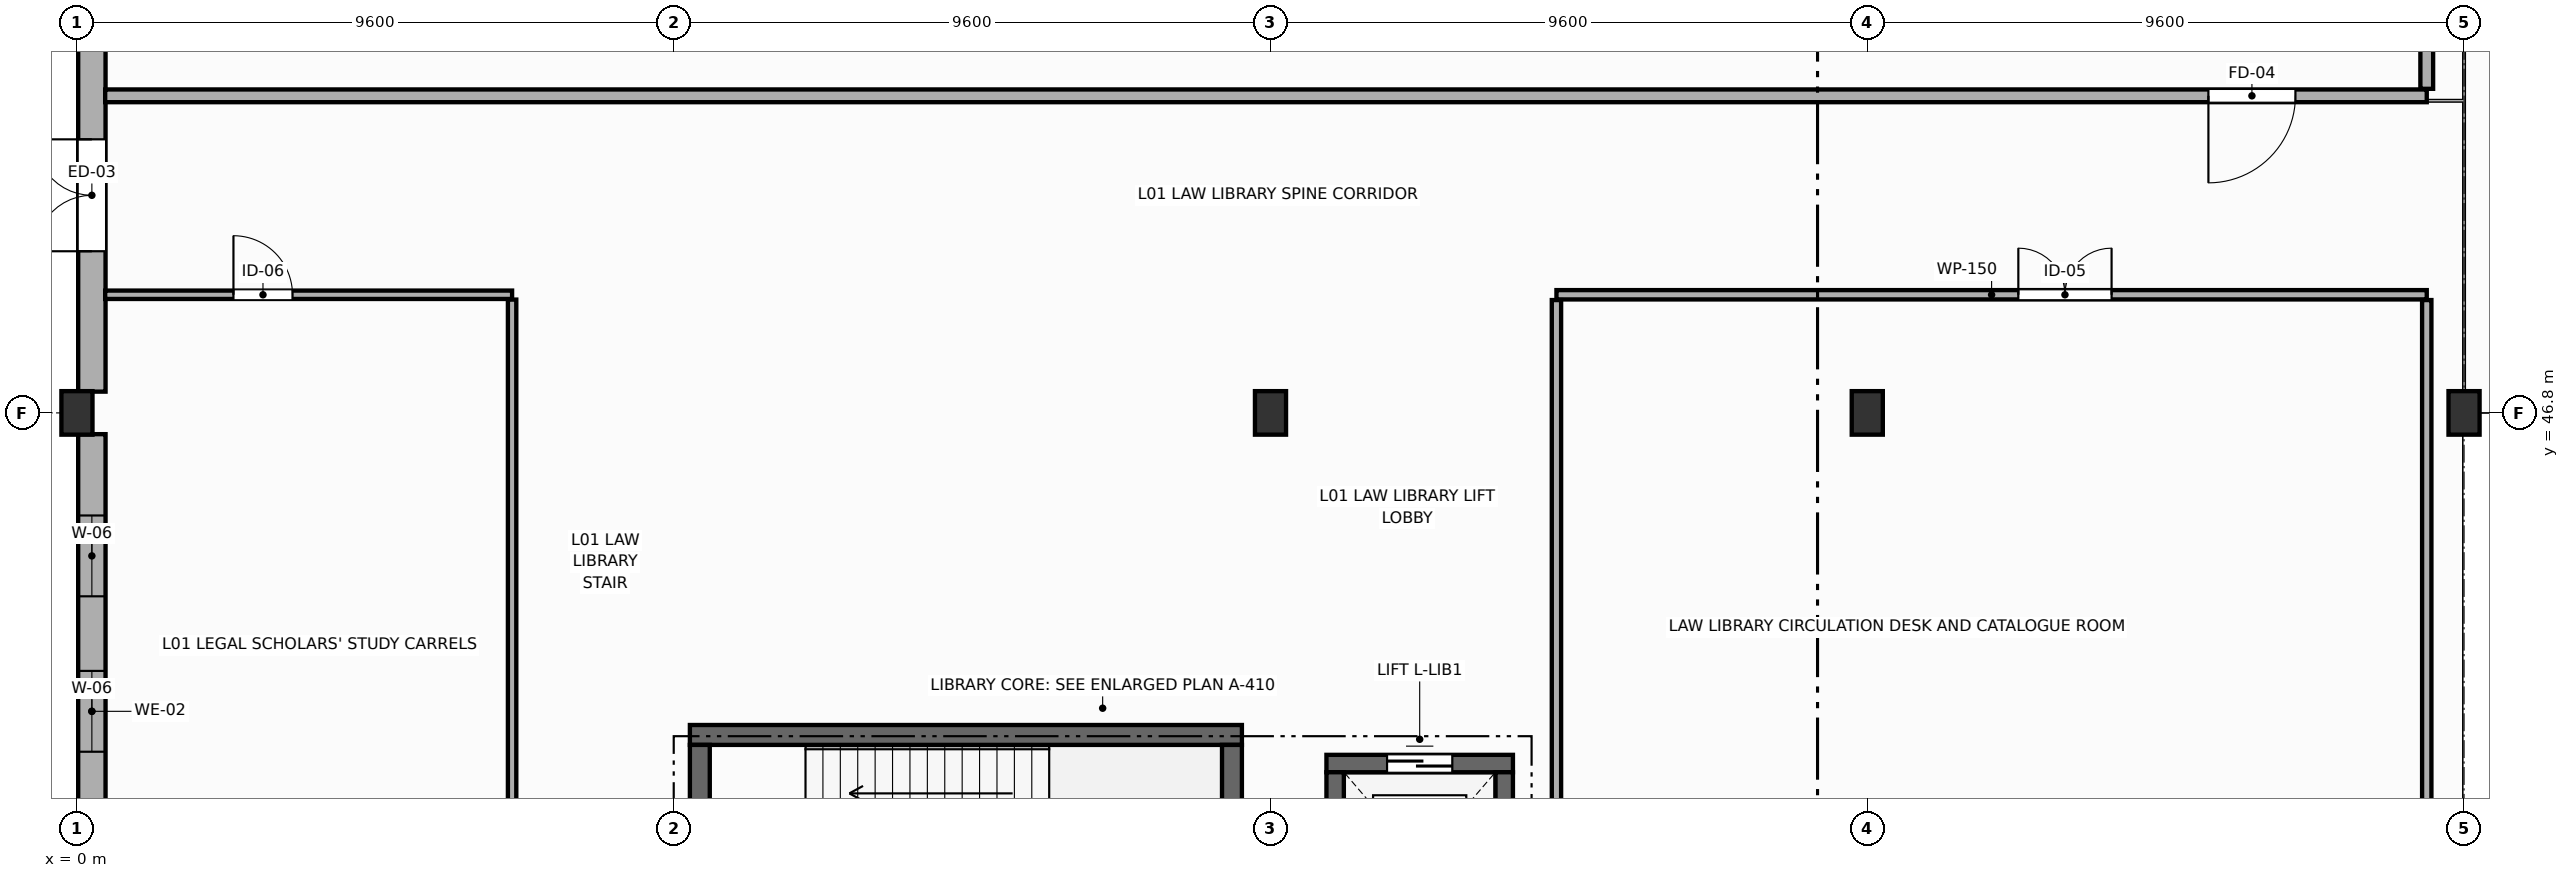
"""IFC4 building model, lengths in metres.
Left out: names, types, materials, properties, quantities, classifications, styles, units other than length and angle.
Written with IfcOpenShell. Run it as: python <this file> out.ifc"""

import sys

from ifc_helpers import new_model, si_unit, direction, frame, frame_2d, origin, origin_2d, place, context, subcontext, project, spatial, rectangle, extrude, element, fill, save


model = new_model("IFC4")
c1 = context("Model", 3, precision=1e-05, world=origin(), true_north=direction((0.0, 1.0)))
c2 = subcontext(c1, "Body", "Model", "MODEL_VIEW")
j1 = project(units=[si_unit("LENGTHUNIT", "METRE"), si_unit("PLANEANGLEUNIT", "RADIAN")], contexts=[c1])
p1 = place(None, origin())
s1 = spatial("IfcSite", under=j1, at=p1, CompositionType="ELEMENT")
p2 = place(p1, origin())
s2 = spatial("IfcBuilding", under=s1, at=p2, CompositionType="ELEMENT")
p3 = place(p2, origin())
s3 = spatial("IfcBuildingStorey", under=s2, at=p3, CompositionType="ELEMENT", Elevation=0.0)
for number, where, z_axis, x_axis in (
    (1, (0.0, 46.8, 0.0), (0.0, 0.0, 1.0), (1.0, 0.0, 0.0)),
    (2, (19.2, 46.8, 0.0), (0.0, 0.0, 1.0), (1.0, 0.0, 0.0)),
    (3, (28.8, 46.8, 0.0), (0.0, 0.0, 1.0), (1.0, 0.0, 0.0)),
    (4, (38.4, 46.8, 0.0), (0.0, 0.0, 1.0), (1.0, 0.0, 0.0)),
):
    element("IfcColumn", number, at=place(p3, frame(where, z_axis=z_axis, x_axis=x_axis)), inside=s3, PredefinedType="COLUMN", context=c2, shape_type="SweptSolid", body=[
        extrude(rectangle(XDim=0.5, YDim=0.7, at=origin_2d()), origin(), (0.0, 0.0, 1.0), 5.4),
    ])
p4 = place(p3, frame((0.24, 37.542, 0.0), z_axis=(0.0, 0.0, 1.0), x_axis=(0.0, 1.0, 0.0)))
e5 = element("IfcWall", 5, at=p4, inside=s3, PredefinedType="STANDARD", context=c2, shape_type="SweptSolid", body=[
    extrude(rectangle(XDim=8.916, YDim=0.44, at=frame_2d((4.458, 0.0))), origin(), (0.0, 0.0, 1.0), 4.28),
])
p5 = place(p4, frame((1.308, 0.0, 0.9)))
e6 = element("IfcOpeningElement", 6, at=p5, cuts=e5, PredefinedType="OPENING", context=c2, shape_type="SweptSolid", body=[
    extrude(rectangle(XDim=1.3, YDim=2.1, at=frame_2d((0.65, 1.05))), frame((0.0, 0.23, 0.0), z_axis=(0.0, -1.0, 0.0), x_axis=(1.0, 0.0, 0.0)), (0.0, 0.0, 1.0), 0.46),
])
p6 = place(p4, frame((3.808, 0.0, 0.9)))
e7 = element("IfcOpeningElement", 7, at=p6, cuts=e5, PredefinedType="OPENING", context=c2, shape_type="SweptSolid", body=[
    extrude(rectangle(XDim=1.3, YDim=2.1, at=frame_2d((0.65, 1.05))), frame((0.0, 0.23, 0.0), z_axis=(0.0, -1.0, 0.0), x_axis=(1.0, 0.0, 0.0)), (0.0, 0.0, 1.0), 0.46),
])
p7 = place(p4, frame((6.308, 0.0, 0.9)))
e8 = element("IfcOpeningElement", 8, at=p7, cuts=e5, PredefinedType="OPENING", context=c2, shape_type="SweptSolid", body=[
    extrude(rectangle(XDim=1.3, YDim=2.1, at=frame_2d((0.65, 1.05))), frame((0.0, 0.23, 0.0), z_axis=(0.0, -1.0, 0.0), x_axis=(1.0, 0.0, 0.0)), (0.0, 0.0, 1.0), 0.46),
])
p8 = place(p3, frame((0.24, 47.142, 0.0), z_axis=(0.0, 0.0, 1.0), x_axis=(0.0, 1.0, 0.0)))
e9 = element("IfcWall", 9, at=p8, inside=s3, PredefinedType="STANDARD", context=c2, shape_type="SweptSolid", body=[
    extrude(rectangle(XDim=8.916, YDim=0.44, at=frame_2d((4.458, 0.0))), origin(), (0.0, 0.0, 1.0), 4.28),
])
p9 = place(p8, frame((2.258, 0.0, 0.0)))
e10 = element("IfcOpeningElement", 10, at=p9, cuts=e9, PredefinedType="OPENING", context=c2, shape_type="SweptSolid", body=[
    extrude(rectangle(XDim=1.8, YDim=2.25, at=frame_2d((0.9, 1.125))), frame((0.0, 0.23, 0.0), z_axis=(0.0, -1.0, 0.0), x_axis=(1.0, 0.0, 0.0)), (0.0, 0.0, 1.0), 0.46),
])
p10 = place(p3, frame((9.86, 41.62, 0.0), z_axis=(0.0, 0.0, 1.0), x_axis=(1.0, 0.0, 0.0)))
e11 = element("IfcWall", 11, at=p10, inside=s3, PredefinedType="SHEAR", context=c2, shape_type="SweptSolid", body=[
    extrude(rectangle(XDim=8.88, YDim=0.32, at=frame_2d((4.44, 0.0))), origin(), (0.0, 0.0, 1.0), 5.14),
])
p11 = place(p3, frame((10.02, 38.18, 0.0), z_axis=(0.0, 0.0, 1.0), x_axis=(0.0, 1.0, 0.0)))
e12 = element("IfcWall", 12, at=p11, inside=s3, PredefinedType="SHEAR", context=c2, shape_type="SweptSolid", body=[
    extrude(rectangle(XDim=3.28, YDim=0.32, at=frame_2d((1.64, 0.0))), origin(), (0.0, 0.0, 1.0), 5.14),
])
p12 = place(p11, frame((1.065, 0.0, 0.0)))
e13 = element("IfcOpeningElement", 13, at=p12, cuts=e12, PredefinedType="OPENING", context=c2, shape_type="SweptSolid", body=[
    extrude(rectangle(XDim=1.15, YDim=2.2, at=frame_2d((0.575, 1.1))), frame((0.0, 0.17, 0.0), z_axis=(0.0, -1.0, 0.0), x_axis=(1.0, 0.0, 0.0)), (0.0, 0.0, 1.0), 0.34),
])
p13 = place(p3, frame((18.58, 41.46, 0.0), z_axis=(0.0, 0.0, 1.0), x_axis=(0.0, -1.0, 0.0)))
e14 = element("IfcWall", 14, at=p13, inside=s3, PredefinedType="SHEAR", context=c2, shape_type="SweptSolid", body=[
    extrude(rectangle(XDim=3.28, YDim=0.32, at=frame_2d((1.64, 0.0))), origin(), (0.0, 0.0, 1.0), 5.14),
])
p14 = place(p3, frame((20.1, 41.16, 0.0), z_axis=(0.0, 0.0, 1.0), x_axis=(1.0, 0.0, 0.0)))
e15 = element("IfcWall", 15, at=p14, inside=s3, PredefinedType="SHEAR", context=c2, shape_type="SweptSolid", body=[
    extrude(rectangle(XDim=3.0, YDim=0.28, at=frame_2d((1.5, 0.0))), origin(), (0.0, 0.0, 1.0), 5.14),
])
p15 = place(p14, frame((0.975, 0.0, 0.0)))
e16 = element("IfcOpeningElement", 16, at=p15, cuts=e15, PredefinedType="OPENING", context=c2, shape_type="SweptSolid", body=[
    extrude(rectangle(XDim=1.05, YDim=2.2, at=frame_2d((0.525, 1.1))), frame((0.0, 0.15, 0.0), z_axis=(0.0, -1.0, 0.0), x_axis=(1.0, 0.0, 0.0)), (0.0, 0.0, 1.0), 0.3),
])
for number, where, z_axis, x_axis in (
    (17, (20.24, 38.18, 0.0), (0.0, 0.0, 1.0), (0.0, 1.0, 0.0)),
    (18, (22.96, 41.02, 0.0), (0.0, 0.0, 1.0), (0.0, -1.0, 0.0)),
):
    element("IfcWall", number, at=place(p3, frame(where, z_axis=z_axis, x_axis=x_axis)), inside=s3, PredefinedType="SHEAR", context=c2, shape_type="SweptSolid", body=[
        extrude(rectangle(XDim=2.84, YDim=0.28, at=frame_2d((1.42, 0.0))), origin(), (0.0, 0.0, 1.0), 5.14),
    ])
p16 = place(p3, frame((37.8, 51.9, 0.0), z_axis=(0.0, 0.0, 1.0), x_axis=(-1.0, 0.0, 0.0)))
e19 = element("IfcWall", 19, at=p16, inside=s3, PredefinedType="STANDARD", context=c2, shape_type="SweptSolid", body=[
    extrude(rectangle(XDim=37.346, YDim=0.205, at=frame_2d((18.673, 0.0))), origin(), (0.0, 0.0, 1.0), 4.13),
])
p17 = place(p16, frame((2.112, 0.0, 0.0)))
e20 = element("IfcOpeningElement", 20, at=p17, cuts=e19, PredefinedType="OPENING", context=c2, shape_type="SweptSolid", body=[
    extrude(rectangle(XDim=1.4, YDim=2.25, at=frame_2d((0.7, 1.125))), frame((0.0, 0.113, 0.0), z_axis=(0.0, -1.0, 0.0), x_axis=(1.0, 0.0, 0.0)), (0.0, 0.0, 1.0), 0.225),
])
p18 = place(p3, frame((37.8, 66.488, 0.0), z_axis=(0.0, 0.0, 1.0), x_axis=(0.0, -1.0, 0.0)))
e21 = element("IfcWall", 21, at=p18, inside=s3, PredefinedType="STANDARD", context=c2, shape_type="SweptSolid", body=[
    extrude(rectangle(XDim=14.475, YDim=0.205, at=frame_2d((7.238, 0.0))), origin(), (0.0, 0.0, 1.0), 4.33),
])
p19 = place(p3, frame((0.454, 48.7, 0.0), z_axis=(0.0, 0.0, 1.0), x_axis=(1.0, 0.0, 0.0)))
e22 = element("IfcWall", 22, at=p19, inside=s3, PredefinedType="PARTITIONING", context=c2, shape_type="SweptSolid", body=[
    extrude(rectangle(XDim=6.546, YDim=0.135, at=frame_2d((3.273, 0.0))), origin(), (0.0, 0.0, 1.0), 4.28),
])
p20 = place(p19, frame((2.064, 0.0, 0.0)))
e23 = element("IfcOpeningElement", 23, at=p20, cuts=e22, PredefinedType="OPENING", context=c2, shape_type="SweptSolid", body=[
    extrude(rectangle(XDim=0.95, YDim=2.15, at=frame_2d((0.475, 1.075))), frame((0.0, 0.077, 0.0), z_axis=(0.0, -1.0, 0.0), x_axis=(1.0, 0.0, 0.0)), (0.0, 0.0, 1.0), 0.155),
])
p21 = place(p3, frame((7.0, 48.623, 0.0), z_axis=(0.0, 0.0, 1.0), x_axis=(0.0, -1.0, 0.0)))
e24 = element("IfcWall", 24, at=p21, inside=s3, PredefinedType="PARTITIONING", context=c2, shape_type="SweptSolid", body=[
    extrude(rectangle(XDim=11.448, YDim=0.135, at=frame_2d((5.724, 0.0))), origin(), (0.0, 0.0, 1.0), 4.33),
])
p22 = place(p3, frame((23.8, 48.7, 0.0), z_axis=(0.0, 0.0, 1.0), x_axis=(1.0, 0.0, 0.0)))
e25 = element("IfcWall", 25, at=p22, inside=s3, PredefinedType="PARTITIONING", context=c2, shape_type="SweptSolid", body=[
    extrude(rectangle(XDim=14.0, YDim=0.15, at=frame_2d((7.0, 0.0))), origin(), (0.0, 0.0, 1.0), 4.28),
])
p23 = place(p22, frame((7.43, 0.0, 0.0)))
e26 = element("IfcOpeningElement", 26, at=p23, cuts=e25, PredefinedType="OPENING", context=c2, shape_type="SweptSolid", body=[
    extrude(rectangle(XDim=1.5, YDim=2.35, at=frame_2d((0.75, 1.175))), frame((0.0, 0.085, 0.0), z_axis=(0.0, -1.0, 0.0), x_axis=(1.0, 0.0, 0.0)), (0.0, 0.0, 1.0), 0.17),
])
for number, where, z_axis, x_axis in (
    (27, (23.8, 37.885, 0.0), (0.0, 0.0, 1.0), (0.0, 1.0, 0.0)),
    (28, (37.8, 48.615, 0.0), (0.0, 0.0, 1.0), (0.0, -1.0, 0.0)),
):
    element("IfcWall", number, at=place(p3, frame(where, z_axis=z_axis, x_axis=x_axis)), inside=s3, PredefinedType="PARTITIONING", context=c2, shape_type="SweptSolid", body=[
        extrude(rectangle(XDim=10.73, YDim=0.15, at=frame_2d((5.365, 0.0))), origin(), (0.0, 0.0, 1.0), 4.33),
    ])
p24 = place(p6, origin())
e29 = element("IfcWindow", 29, at=p24, inside=s3, PartitioningType="SINGLE_PANEL", PredefinedType="WINDOW", context=c2, shape_type="SweptSolid", body=[
    extrude(rectangle(XDim=1.3, YDim=2.1, at=frame_2d((0.65, 1.05))), frame((0.0, 0.03, 0.0), z_axis=(0.0, -1.0, 0.0), x_axis=(1.0, 0.0, 0.0)), (0.0, 0.0, 1.0), 0.06),
])
fill(e7, e29)
p25 = place(p7, origin())
e30 = element("IfcWindow", 30, at=p25, inside=s3, PartitioningType="SINGLE_PANEL", PredefinedType="WINDOW", context=c2, shape_type="SweptSolid", body=[
    extrude(rectangle(XDim=1.3, YDim=2.1, at=frame_2d((0.65, 1.05))), frame((0.0, 0.03, 0.0), z_axis=(0.0, -1.0, 0.0), x_axis=(1.0, 0.0, 0.0)), (0.0, 0.0, 1.0), 0.06),
])
fill(e8, e30)
p26 = place(p9, origin())
e31 = element("IfcDoor", 31, at=p26, inside=s3, OperationType="DOUBLE_DOOR_SINGLE_SWING", PredefinedType="DOOR", context=c2, shape_type="SweptSolid", body=[
    extrude(rectangle(XDim=1.8, YDim=2.25, at=frame_2d((0.9, 1.125))), frame((0.0, 0.025, 0.0), z_axis=(0.0, -1.0, 0.0), x_axis=(1.0, 0.0, 0.0)), (0.0, 0.0, 1.0), 0.05),
])
fill(e10, e31)
p27 = place(p15, origin())
e32 = element("IfcDoor", 32, at=p27, inside=s3, OperationType="DOUBLE_DOOR_SLIDING", PredefinedType="DOOR", context=c2, shape_type="SweptSolid", body=[
    extrude(rectangle(XDim=1.05, YDim=2.2, at=frame_2d((0.525, 1.1))), frame((0.0, 0.025, 0.0), z_axis=(0.0, -1.0, 0.0), x_axis=(1.0, 0.0, 0.0)), (0.0, 0.0, 1.0), 0.05),
])
fill(e16, e32)
p28 = place(p17, origin())
e33 = element("IfcDoor", 33, at=p28, inside=s3, OperationType="SINGLE_SWING_RIGHT", PredefinedType="DOOR", context=c2, shape_type="SweptSolid", body=[
    extrude(rectangle(XDim=1.4, YDim=2.25, at=frame_2d((0.7, 1.125))), frame((0.0, 0.025, 0.0), z_axis=(0.0, -1.0, 0.0), x_axis=(1.0, 0.0, 0.0)), (0.0, 0.0, 1.0), 0.05),
])
fill(e20, e33)
p29 = place(p20, origin())
e34 = element("IfcDoor", 34, at=p29, inside=s3, OperationType="SINGLE_SWING_LEFT", PredefinedType="DOOR", context=c2, shape_type="SweptSolid", body=[
    extrude(rectangle(XDim=0.95, YDim=2.15, at=frame_2d((0.475, 1.075))), frame((0.0, 0.025, 0.0), z_axis=(0.0, -1.0, 0.0), x_axis=(1.0, 0.0, 0.0)), (0.0, 0.0, 1.0), 0.05),
])
fill(e23, e34)
p30 = place(p23, origin())
e35 = element("IfcDoor", 35, at=p30, inside=s3, OperationType="DOUBLE_DOOR_SINGLE_SWING", PredefinedType="DOOR", context=c2, shape_type="SweptSolid", body=[
    extrude(rectangle(XDim=1.5, YDim=2.35, at=frame_2d((0.75, 1.175))), frame((0.0, 0.025, 0.0), z_axis=(0.0, -1.0, 0.0), x_axis=(1.0, 0.0, 0.0)), (0.0, 0.0, 1.0), 0.05),
])
fill(e26, e35)
save(model, sys.argv[1])
